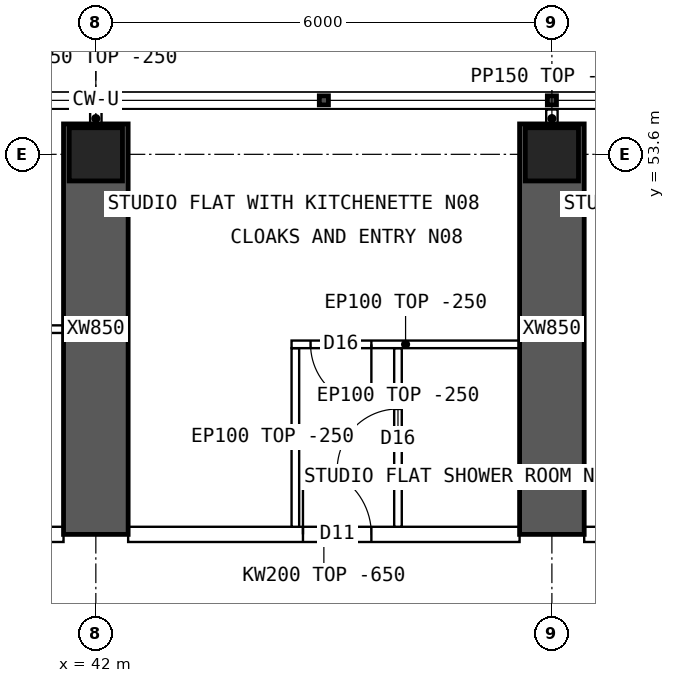
"""IFC4 building model, lengths in metres.
Left out: names, types, materials, properties, quantities, classifications, styles, units other than length and angle.
Written with IfcOpenShell. Run it as: python <this file> out.ifc"""

import sys

from ifc_helpers import new_model, si_unit, direction, frame, frame_2d, origin, origin_2d, place, context, subcontext, project, spatial, polyline, rectangle, hollow_rectangle, outline, extrude, element, fill, save


model = new_model("IFC4")
c1 = context("Model", 3, precision=1e-05, world=origin(), true_north=direction((0.0, 1.0)))
c2 = subcontext(c1, "Body", "Model", "MODEL_VIEW")
j1 = project(units=[si_unit("LENGTHUNIT", "METRE"), si_unit("PLANEANGLEUNIT", "RADIAN")], contexts=[c1])
p1 = place(None, origin())
s1 = spatial("IfcSite", under=j1, at=p1, CompositionType="ELEMENT")
p2 = place(p1, origin())
s2 = spatial("IfcBuilding", under=s1, at=p2, CompositionType="ELEMENT")
p3 = place(p2, frame((0.0, 0.0, 156.1)))
s3 = spatial("IfcBuildingStorey", under=s2, at=p3, CompositionType="ELEMENT", Elevation=156.1)
for number, where, z_axis, x_axis in (
    (1, (42.0, 53.6, 0.0), (0.0, 0.0, 1.0), (1.0, 0.0, 0.0)),
    (2, (48.0, 53.6, 0.0), (0.0, 0.0, 1.0), (1.0, 0.0, 0.0)),
):
    element("IfcColumn", number, at=place(p3, frame(where, z_axis=z_axis, x_axis=x_axis)), inside=s3, PredefinedType="COLUMN", context=c2, shape_type="SweptSolid", body=[
        extrude(hollow_rectangle(XDim=0.7, YDim=0.7, WallThickness=0.07, at=origin_2d()), origin(), (0.0, 0.0, 1.0), 3.75),
    ])
for number, where, z_axis, x_axis in (
    (3, (42.0, 48.6, 0.0), (0.0, 0.0, 1.0), (0.0, 1.0, 0.0)),
    (4, (48.0, 48.6, 0.0), (0.0, 0.0, 1.0), (0.0, 1.0, 0.0)),
):
    element("IfcWall", number, at=place(p3, frame(where, z_axis=z_axis, x_axis=x_axis)), inside=s3, PredefinedType="SHEAR", context=c2, shape_type="SweptSolid", body=[
        extrude(rectangle(XDim=5.4, YDim=0.85, at=frame_2d((2.7, 0.0))), origin(), (0.0, 0.0, 1.0), 3.75),
    ])
p4 = place(p3, frame((36.425, 48.6, 0.0), z_axis=(0.0, 0.0, 1.0), x_axis=(1.0, 0.0, 0.0)))
e5 = element("IfcWall", 5, at=p4, inside=s3, PredefinedType="SOLIDWALL", context=c2, shape_type="SweptSolid", body=[
    extrude(outline(polyline([(0.0, 0.0), (5.15, 0.0), (5.15, 3.1), (0.0, 3.1), (0.0, 0.0)])), frame((0.0, 0.1, 0.0), z_axis=(0.0, -1.0, 0.0), x_axis=(1.0, 0.0, 0.0)), (0.0, 0.0, 1.0), 0.2),
])
p5 = place(p4, frame((0.3, 0.0, 0.0)))
e6 = element("IfcOpeningElement", 6, at=p5, cuts=e5, PredefinedType="OPENING", context=c2, shape_type="SweptSolid", body=[
    extrude(rectangle(XDim=1.0, YDim=2.1, at=frame_2d((0.5, 1.05))), frame((0.0, 0.11, 0.0), z_axis=(0.0, -1.0, 0.0), x_axis=(1.0, 0.0, 0.0)), (0.0, 0.0, 1.0), 0.22),
])
p6 = place(p3, frame((42.425, 48.6, 0.0), z_axis=(0.0, 0.0, 1.0), x_axis=(1.0, 0.0, 0.0)))
e7 = element("IfcWall", 7, at=p6, inside=s3, PredefinedType="SOLIDWALL", context=c2, shape_type="SweptSolid", body=[
    extrude(outline(polyline([(0.0, 0.0), (5.15, 0.0), (5.15, 3.1), (0.0, 3.1), (0.0, 0.0)])), frame((0.0, 0.1, 0.0), z_axis=(0.0, -1.0, 0.0), x_axis=(1.0, 0.0, 0.0)), (0.0, 0.0, 1.0), 0.2),
])
p7 = place(p6, frame((2.3, 0.0, 0.0)))
e8 = element("IfcOpeningElement", 8, at=p7, cuts=e7, PredefinedType="OPENING", context=c2, shape_type="SweptSolid", body=[
    extrude(rectangle(XDim=0.9, YDim=2.1, at=frame_2d((0.45, 1.05))), frame((0.0, 0.11, 0.0), z_axis=(0.0, -1.0, 0.0), x_axis=(1.0, 0.0, 0.0)), (0.0, 0.0, 1.0), 0.22),
])
p8 = place(p3, frame((48.425, 48.6, 0.0), z_axis=(0.0, 0.0, 1.0), x_axis=(1.0, 0.0, 0.0)))
e9 = element("IfcWall", 9, at=p8, inside=s3, PredefinedType="SOLIDWALL", context=c2, shape_type="SweptSolid", body=[
    extrude(outline(polyline([(0.0, 0.0), (5.15, 0.0), (5.15, 3.1), (0.0, 3.1), (0.0, 0.0)])), frame((0.0, 0.1, 0.0), z_axis=(0.0, -1.0, 0.0), x_axis=(1.0, 0.0, 0.0)), (0.0, 0.0, 1.0), 0.2),
])
p9 = place(p8, frame((2.3, 0.0, 0.0)))
e10 = element("IfcOpeningElement", 10, at=p9, cuts=e9, PredefinedType="OPENING", context=c2, shape_type="SweptSolid", body=[
    extrude(rectangle(XDim=0.9, YDim=2.1, at=frame_2d((0.45, 1.05))), frame((0.0, 0.11, 0.0), z_axis=(0.0, -1.0, 0.0), x_axis=(1.0, 0.0, 0.0)), (0.0, 0.0, 1.0), 0.22),
])
p10 = place(p3, frame((38.925, 51.3, 0.0), z_axis=(0.0, 0.0, 1.0), x_axis=(1.0, 0.0, 0.0)))
e11 = element("IfcWall", 11, at=p10, inside=s3, PredefinedType="PARTITIONING", context=c2, shape_type="SweptSolid", body=[
    extrude(rectangle(XDim=2.65, YDim=0.1, at=frame_2d((1.325, 0.0))), origin(), (0.0, 0.0, 1.0), 3.5),
])
p11 = place(p3, frame((44.575, 51.1, 0.0), z_axis=(0.0, 0.0, 1.0), x_axis=(1.0, 0.0, 0.0)))
e12 = element("IfcWall", 12, at=p11, inside=s3, PredefinedType="PARTITIONING", context=c2, shape_type="SweptSolid", body=[
    extrude(rectangle(XDim=3.0, YDim=0.1, at=frame_2d((1.5, 0.0))), origin(), (0.0, 0.0, 1.0), 3.5),
])
p12 = place(p11, frame((0.25, 0.0, 0.0)))
e13 = element("IfcOpeningElement", 13, at=p12, cuts=e12, PredefinedType="OPENING", context=c2, shape_type="SweptSolid", body=[
    extrude(rectangle(XDim=0.8, YDim=2.1, at=frame_2d((0.4, 1.05))), frame((0.0, 0.06, 0.0), z_axis=(0.0, -1.0, 0.0), x_axis=(1.0, 0.0, 0.0)), (0.0, 0.0, 1.0), 0.12),
])
p13 = place(p3, frame((44.625, 51.05, 0.0), z_axis=(0.0, 0.0, 1.0), x_axis=(0.0, -1.0, 0.0)))
e14 = element("IfcWall", 14, at=p13, inside=s3, PredefinedType="PARTITIONING", context=c2, shape_type="SweptSolid", body=[
    extrude(outline(polyline([(0.0, 0.0), (2.35, 0.0), (2.35, 3.1), (2.302, 3.1), (2.3, 3.5), (0.0, 3.5), (0.0, 0.0)])), frame((0.0, 0.05, 0.0), z_axis=(0.0, -1.0, 0.0), x_axis=(1.0, 0.0, 0.0)), (0.0, 0.0, 1.0), 0.1),
])
p14 = place(p3, frame((45.975, 51.05, 0.0), z_axis=(0.0, 0.0, 1.0), x_axis=(0.0, -1.0, 0.0)))
e15 = element("IfcWall", 15, at=p14, inside=s3, PredefinedType="PARTITIONING", context=c2, shape_type="SweptSolid", body=[
    extrude(outline(polyline([(0.0, 0.0), (2.35, 0.0), (2.35, 3.1), (2.302, 3.1), (2.3, 3.5), (0.0, 3.5), (0.0, 0.0)])), frame((0.0, 0.05, 0.0), z_axis=(0.0, -1.0, 0.0), x_axis=(1.0, 0.0, 0.0)), (0.0, 0.0, 1.0), 0.1),
])
p15 = place(p14, frame((0.8, 0.0, 0.0)))
e16 = element("IfcOpeningElement", 16, at=p15, cuts=e15, PredefinedType="OPENING", context=c2, shape_type="SweptSolid", body=[
    extrude(rectangle(XDim=0.8, YDim=2.1, at=frame_2d((0.4, 1.05))), frame((0.0, 0.06, 0.0), z_axis=(0.0, -1.0, 0.0), x_axis=(1.0, 0.0, 0.0)), (0.0, 0.0, 1.0), 0.12),
])
for number, where, z_axis, x_axis in (
    (17, (42.0, 53.95, 0.0), (0.0, 0.0, 1.0), (0.0, 1.0, 0.0)),
    (18, (48.0, 53.95, 0.0), (0.0, 0.0, 1.0), (0.0, 1.0, 0.0)),
):
    element("IfcWall", number, at=place(p3, frame(where, z_axis=z_axis, x_axis=x_axis)), inside=s3, PredefinedType="PARTITIONING", context=c2, shape_type="SweptSolid", body=[
        extrude(rectangle(XDim=0.24, YDim=0.15, at=frame_2d((0.12, 0.0))), origin(), (0.0, 0.0, 1.0), 3.5),
    ])
p16 = place(p12, origin())
e19 = element("IfcDoor", 19, at=p16, inside=s3, OperationType="SINGLE_SWING_RIGHT", PredefinedType="DOOR", context=c2, shape_type="SweptSolid", body=[
    extrude(rectangle(XDim=0.8, YDim=2.1, at=frame_2d((0.4, 1.05))), frame((0.0, 0.025, 0.0), z_axis=(0.0, -1.0, 0.0), x_axis=(1.0, 0.0, 0.0)), (0.0, 0.0, 1.0), 0.05),
])
fill(e13, e19)
p17 = place(p15, origin())
e20 = element("IfcDoor", 20, at=p17, inside=s3, OperationType="SINGLE_SWING_RIGHT", PredefinedType="DOOR", context=c2, shape_type="SweptSolid", body=[
    extrude(rectangle(XDim=0.8, YDim=2.1, at=frame_2d((0.4, 1.05))), frame((0.0, 0.025, 0.0), z_axis=(0.0, -1.0, 0.0), x_axis=(1.0, 0.0, 0.0)), (0.0, 0.0, 1.0), 0.05),
])
fill(e16, e20)
p18 = place(p7, origin())
e21 = element("IfcDoor", 21, at=p18, inside=s3, OperationType="SINGLE_SWING_LEFT", PredefinedType="DOOR", context=c2, shape_type="SweptSolid", body=[
    extrude(rectangle(XDim=0.9, YDim=2.1, at=frame_2d((0.45, 1.05))), frame((0.0, 0.025, 0.0), z_axis=(0.0, -1.0, 0.0), x_axis=(1.0, 0.0, 0.0)), (0.0, 0.0, 1.0), 0.05),
])
fill(e8, e21)
save(model, sys.argv[1])
